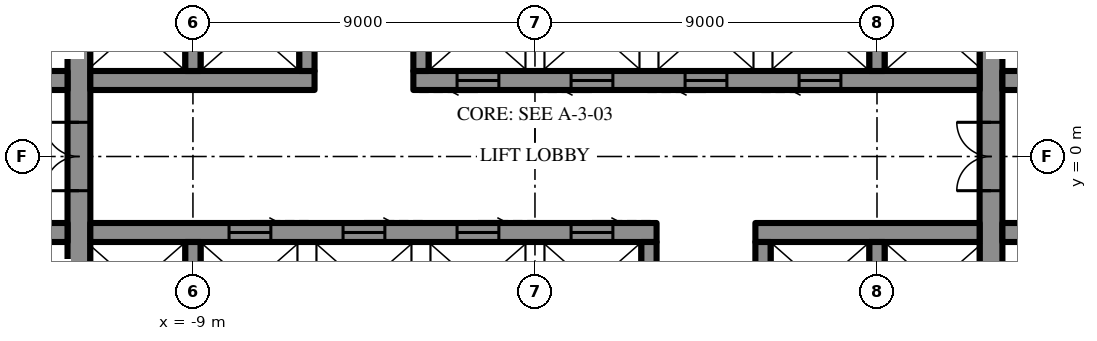
"""IFC4 building model, lengths in metres.
Left out: names, types, materials, properties, quantities, classifications, styles, units other than length and angle.
Written with IfcOpenShell. Run it as: python <this file> out.ifc"""

import sys

from ifc_helpers import new_model, si_unit, direction, frame, frame_2d, origin, place, context, subcontext, project, spatial, rectangle, extrude, element, fill, save


model = new_model("IFC4")
c1 = context("Model", 3, precision=1e-05, world=origin(), true_north=direction((0.0, 1.0)))
c2 = subcontext(c1, "Body", "Model", "MODEL_VIEW")
j1 = project(units=[si_unit("LENGTHUNIT", "METRE"), si_unit("PLANEANGLEUNIT", "RADIAN")], contexts=[c1])
p1 = place(None, origin())
s1 = spatial("IfcSite", under=j1, at=p1, CompositionType="ELEMENT")
p2 = place(p1, origin())
s2 = spatial("IfcBuilding", under=s1, at=p2, CompositionType="ELEMENT")
p3 = place(p2, frame((0.0, 0.0, 295.3)))
s3 = spatial("IfcBuildingStorey", under=s2, at=p3, CompositionType="ELEMENT", Elevation=295.3)
p4 = place(p3, frame((12.0, -10.7, 0.0), z_axis=(0.0, 0.0, 1.0), x_axis=(0.0, 1.0, 0.0)))
e1 = element("IfcWall", 1, at=p4, inside=s3, PredefinedType="SHEAR", context=c2, shape_type="SweptSolid", body=[
    extrude(rectangle(XDim=21.4, YDim=0.6, at=frame_2d((10.7, 0.0))), origin(), (0.0, 0.0, 1.0), 4.2),
])
p5 = place(p4, frame((9.8, 0.0, 0.0)))
e2 = element("IfcOpeningElement", 2, at=p5, cuts=e1, PredefinedType="OPENING", context=c2, shape_type="SweptSolid", body=[
    extrude(rectangle(XDim=1.8, YDim=2.4, at=frame_2d((0.9, 1.2))), frame((0.0, 0.31, 0.0), z_axis=(0.0, -1.0, 0.0), x_axis=(1.0, 0.0, 0.0)), (0.0, 0.0, 1.0), 0.62),
])
p6 = place(p3, frame((-12.0, -10.7, 0.0), z_axis=(0.0, 0.0, 1.0), x_axis=(0.0, 1.0, 0.0)))
e3 = element("IfcWall", 3, at=p6, inside=s3, PredefinedType="SHEAR", context=c2, shape_type="SweptSolid", body=[
    extrude(rectangle(XDim=21.4, YDim=0.6, at=frame_2d((10.7, 0.0))), origin(), (0.0, 0.0, 1.0), 4.2),
])
p7 = place(p6, frame((9.8, 0.0, 0.0)))
e4 = element("IfcOpeningElement", 4, at=p7, cuts=e3, PredefinedType="OPENING", context=c2, shape_type="SweptSolid", body=[
    extrude(rectangle(XDim=1.8, YDim=2.4, at=frame_2d((0.9, 1.2))), frame((0.0, 0.31, 0.0), z_axis=(0.0, -1.0, 0.0), x_axis=(1.0, 0.0, 0.0)), (0.0, 0.0, 1.0), 0.62),
])
p8 = place(p3, frame((-14.5, 2.0, 0.0), z_axis=(0.0, 0.0, 1.0), x_axis=(1.0, 0.0, 0.0)))
e5 = element("IfcWall", 5, at=p8, inside=s3, PredefinedType="SHEAR", context=c2, shape_type="SweptSolid", body=[
    extrude(rectangle(XDim=2.2, YDim=0.5, at=frame_2d((1.1, 0.0))), origin(), (0.0, 0.0, 1.0), 4.2),
])
p9 = place(p8, frame((0.5, 0.0, 0.0)))
e6 = element("IfcOpeningElement", 6, at=p9, cuts=e5, PredefinedType="OPENING", context=c2, shape_type="SweptSolid", body=[
    extrude(rectangle(XDim=0.9, YDim=2.2, at=frame_2d((0.45, 1.1))), frame((0.0, 0.26, 0.0), z_axis=(0.0, -1.0, 0.0), x_axis=(1.0, 0.0, 0.0)), (0.0, 0.0, 1.0), 0.52),
])
p10 = place(p3, frame((-11.7, 2.0, 0.0), z_axis=(0.0, 0.0, 1.0), x_axis=(1.0, 0.0, 0.0)))
e7 = element("IfcWall", 7, at=p10, inside=s3, PredefinedType="SHEAR", context=c2, shape_type="SweptSolid", body=[
    extrude(rectangle(XDim=5.9, YDim=0.5, at=frame_2d((2.95, 0.0))), origin(), (0.0, 0.0, 1.0), 4.2),
])
p11 = place(p3, frame((-3.2, 2.0, 0.0), z_axis=(0.0, 0.0, 1.0), x_axis=(1.0, 0.0, 0.0)))
e8 = element("IfcWall", 8, at=p11, inside=s3, PredefinedType="SHEAR", context=c2, shape_type="SweptSolid", body=[
    extrude(rectangle(XDim=14.9, YDim=0.5, at=frame_2d((7.45, 0.0))), origin(), (0.0, 0.0, 1.0), 4.2),
])
p12 = place(p11, frame((1.15, 0.0, 0.0)))
e9 = element("IfcOpeningElement", 9, at=p12, cuts=e8, PredefinedType="OPENING", context=c2, shape_type="SweptSolid", body=[
    extrude(rectangle(XDim=1.1, YDim=2.2, at=frame_2d((0.55, 1.1))), frame((0.0, 0.26, 0.0), z_axis=(0.0, -1.0, 0.0), x_axis=(1.0, 0.0, 0.0)), (0.0, 0.0, 1.0), 0.52),
])
p13 = place(p11, frame((4.15, 0.0, 0.0)))
e10 = element("IfcOpeningElement", 10, at=p13, cuts=e8, PredefinedType="OPENING", context=c2, shape_type="SweptSolid", body=[
    extrude(rectangle(XDim=1.1, YDim=2.2, at=frame_2d((0.55, 1.1))), frame((0.0, 0.26, 0.0), z_axis=(0.0, -1.0, 0.0), x_axis=(1.0, 0.0, 0.0)), (0.0, 0.0, 1.0), 0.52),
])
p14 = place(p11, frame((7.15, 0.0, 0.0)))
e11 = element("IfcOpeningElement", 11, at=p14, cuts=e8, PredefinedType="OPENING", context=c2, shape_type="SweptSolid", body=[
    extrude(rectangle(XDim=1.1, YDim=2.2, at=frame_2d((0.55, 1.1))), frame((0.0, 0.26, 0.0), z_axis=(0.0, -1.0, 0.0), x_axis=(1.0, 0.0, 0.0)), (0.0, 0.0, 1.0), 0.52),
])
p15 = place(p11, frame((10.15, 0.0, 0.0)))
e12 = element("IfcOpeningElement", 12, at=p15, cuts=e8, PredefinedType="OPENING", context=c2, shape_type="SweptSolid", body=[
    extrude(rectangle(XDim=1.1, YDim=2.2, at=frame_2d((0.55, 1.1))), frame((0.0, 0.26, 0.0), z_axis=(0.0, -1.0, 0.0), x_axis=(1.0, 0.0, 0.0)), (0.0, 0.0, 1.0), 0.52),
])
p16 = place(p3, frame((12.3, 2.0, 0.0), z_axis=(0.0, 0.0, 1.0), x_axis=(1.0, 0.0, 0.0)))
e13 = element("IfcWall", 13, at=p16, inside=s3, PredefinedType="SHEAR", context=c2, shape_type="SweptSolid", body=[
    extrude(rectangle(XDim=2.2, YDim=0.5, at=frame_2d((1.1, 0.0))), origin(), (0.0, 0.0, 1.0), 4.2),
])
p17 = place(p16, frame((0.8, 0.0, 0.0)))
e14 = element("IfcOpeningElement", 14, at=p17, cuts=e13, PredefinedType="OPENING", context=c2, shape_type="SweptSolid", body=[
    extrude(rectangle(XDim=0.9, YDim=2.2, at=frame_2d((0.45, 1.1))), frame((0.0, 0.26, 0.0), z_axis=(0.0, -1.0, 0.0), x_axis=(1.0, 0.0, 0.0)), (0.0, 0.0, 1.0), 0.52),
])
for number, where, z_axis, x_axis in (
    (15, (-9.0, 2.25, 0.0), (0.0, 0.0, 1.0), (0.0, 1.0, 0.0)),
    (16, (-6.0, 2.25, 0.0), (0.0, 0.0, 1.0), (0.0, 1.0, 0.0)),
    (17, (-3.0, 2.25, 0.0), (0.0, 0.0, 1.0), (0.0, 1.0, 0.0)),
    (18, (9.0, 2.25, 0.0), (0.0, 0.0, 1.0), (0.0, 1.0, 0.0)),
):
    element("IfcWall", number, at=place(p3, frame(where, z_axis=z_axis, x_axis=x_axis)), inside=s3, PredefinedType="SHEAR", context=c2, shape_type="SweptSolid", body=[
        extrude(rectangle(XDim=2.3, YDim=0.4, at=frame_2d((1.15, 0.0))), origin(), (0.0, 0.0, 1.0), 4.2),
    ])
p18 = place(p3, frame((14.5, -2.0, 0.0), z_axis=(0.0, 0.0, 1.0), x_axis=(-1.0, 0.0, 0.0)))
e19 = element("IfcWall", 19, at=p18, inside=s3, PredefinedType="SHEAR", context=c2, shape_type="SweptSolid", body=[
    extrude(rectangle(XDim=2.2, YDim=0.5, at=frame_2d((1.1, 0.0))), origin(), (0.0, 0.0, 1.0), 4.2),
])
p19 = place(p18, frame((0.5, 0.0, 0.0)))
e20 = element("IfcOpeningElement", 20, at=p19, cuts=e19, PredefinedType="OPENING", context=c2, shape_type="SweptSolid", body=[
    extrude(rectangle(XDim=0.9, YDim=2.2, at=frame_2d((0.45, 1.1))), frame((0.0, 0.26, 0.0), z_axis=(0.0, -1.0, 0.0), x_axis=(1.0, 0.0, 0.0)), (0.0, 0.0, 1.0), 0.52),
])
p20 = place(p3, frame((11.7, -2.0, 0.0), z_axis=(0.0, 0.0, 1.0), x_axis=(-1.0, 0.0, 0.0)))
e21 = element("IfcWall", 21, at=p20, inside=s3, PredefinedType="SHEAR", context=c2, shape_type="SweptSolid", body=[
    extrude(rectangle(XDim=5.9, YDim=0.5, at=frame_2d((2.95, 0.0))), origin(), (0.0, 0.0, 1.0), 4.2),
])
p21 = place(p3, frame((3.2, -2.0, 0.0), z_axis=(0.0, 0.0, 1.0), x_axis=(-1.0, 0.0, 0.0)))
e22 = element("IfcWall", 22, at=p21, inside=s3, PredefinedType="SHEAR", context=c2, shape_type="SweptSolid", body=[
    extrude(rectangle(XDim=14.9, YDim=0.5, at=frame_2d((7.45, 0.0))), origin(), (0.0, 0.0, 1.0), 4.2),
])
p22 = place(p21, frame((1.15, 0.0, 0.0)))
e23 = element("IfcOpeningElement", 23, at=p22, cuts=e22, PredefinedType="OPENING", context=c2, shape_type="SweptSolid", body=[
    extrude(rectangle(XDim=1.1, YDim=2.2, at=frame_2d((0.55, 1.1))), frame((0.0, 0.26, 0.0), z_axis=(0.0, -1.0, 0.0), x_axis=(1.0, 0.0, 0.0)), (0.0, 0.0, 1.0), 0.52),
])
p23 = place(p21, frame((4.15, 0.0, 0.0)))
e24 = element("IfcOpeningElement", 24, at=p23, cuts=e22, PredefinedType="OPENING", context=c2, shape_type="SweptSolid", body=[
    extrude(rectangle(XDim=1.1, YDim=2.2, at=frame_2d((0.55, 1.1))), frame((0.0, 0.26, 0.0), z_axis=(0.0, -1.0, 0.0), x_axis=(1.0, 0.0, 0.0)), (0.0, 0.0, 1.0), 0.52),
])
p24 = place(p21, frame((7.15, 0.0, 0.0)))
e25 = element("IfcOpeningElement", 25, at=p24, cuts=e22, PredefinedType="OPENING", context=c2, shape_type="SweptSolid", body=[
    extrude(rectangle(XDim=1.1, YDim=2.2, at=frame_2d((0.55, 1.1))), frame((0.0, 0.26, 0.0), z_axis=(0.0, -1.0, 0.0), x_axis=(1.0, 0.0, 0.0)), (0.0, 0.0, 1.0), 0.52),
])
p25 = place(p21, frame((10.15, 0.0, 0.0)))
e26 = element("IfcOpeningElement", 26, at=p25, cuts=e22, PredefinedType="OPENING", context=c2, shape_type="SweptSolid", body=[
    extrude(rectangle(XDim=1.1, YDim=2.2, at=frame_2d((0.55, 1.1))), frame((0.0, 0.26, 0.0), z_axis=(0.0, -1.0, 0.0), x_axis=(1.0, 0.0, 0.0)), (0.0, 0.0, 1.0), 0.52),
])
p26 = place(p3, frame((-12.3, -2.0, 0.0), z_axis=(0.0, 0.0, 1.0), x_axis=(-1.0, 0.0, 0.0)))
e27 = element("IfcWall", 27, at=p26, inside=s3, PredefinedType="SHEAR", context=c2, shape_type="SweptSolid", body=[
    extrude(rectangle(XDim=2.2, YDim=0.5, at=frame_2d((1.1, 0.0))), origin(), (0.0, 0.0, 1.0), 4.2),
])
p27 = place(p26, frame((0.8, 0.0, 0.0)))
e28 = element("IfcOpeningElement", 28, at=p27, cuts=e27, PredefinedType="OPENING", context=c2, shape_type="SweptSolid", body=[
    extrude(rectangle(XDim=0.9, YDim=2.2, at=frame_2d((0.45, 1.1))), frame((0.0, 0.26, 0.0), z_axis=(0.0, -1.0, 0.0), x_axis=(1.0, 0.0, 0.0)), (0.0, 0.0, 1.0), 0.52),
])
for number, where, z_axis, x_axis in (
    (29, (9.0, -2.25, 0.0), (0.0, 0.0, 1.0), (0.0, -1.0, 0.0)),
    (30, (6.0, -2.25, 0.0), (0.0, 0.0, 1.0), (0.0, -1.0, 0.0)),
    (31, (3.0, -2.25, 0.0), (0.0, 0.0, 1.0), (0.0, -1.0, 0.0)),
    (32, (-9.0, -2.25, 0.0), (0.0, 0.0, 1.0), (0.0, -1.0, 0.0)),
):
    element("IfcWall", number, at=place(p3, frame(where, z_axis=z_axis, x_axis=x_axis)), inside=s3, PredefinedType="SHEAR", context=c2, shape_type="SweptSolid", body=[
        extrude(rectangle(XDim=2.3, YDim=0.4, at=frame_2d((1.15, 0.0))), origin(), (0.0, 0.0, 1.0), 4.2),
    ])
p28 = place(p5, origin())
e33 = element("IfcDoor", 33, at=p28, inside=s3, OperationType="DOUBLE_DOOR_SINGLE_SWING", PredefinedType="DOOR", context=c2, shape_type="SweptSolid", body=[
    extrude(rectangle(XDim=1.8, YDim=2.4, at=frame_2d((0.9, 1.2))), frame((0.0, 0.025, 0.0), z_axis=(0.0, -1.0, 0.0), x_axis=(1.0, 0.0, 0.0)), (0.0, 0.0, 1.0), 0.05),
])
fill(e2, e33)
p29 = place(p7, origin())
e34 = element("IfcDoor", 34, at=p29, inside=s3, OperationType="DOUBLE_DOOR_SINGLE_SWING", PredefinedType="DOOR", context=c2, shape_type="SweptSolid", body=[
    extrude(rectangle(XDim=1.8, YDim=2.4, at=frame_2d((0.9, 1.2))), frame((0.0, 0.025, 0.0), z_axis=(0.0, -1.0, 0.0), x_axis=(1.0, 0.0, 0.0)), (0.0, 0.0, 1.0), 0.05),
])
fill(e4, e34)
p30 = place(p12, frame((1.1, 0.0, 0.0), z_axis=(0.0, 0.0, 1.0), x_axis=(-1.0, 0.0, 0.0)))
e35 = element("IfcDoor", 35, at=p30, inside=s3, OperationType="SLIDING_TO_LEFT", PredefinedType="DOOR", context=c2, shape_type="SweptSolid", body=[
    extrude(rectangle(XDim=1.1, YDim=2.2, at=frame_2d((0.55, 1.1))), frame((0.0, 0.025, 0.0), z_axis=(0.0, -1.0, 0.0), x_axis=(1.0, 0.0, 0.0)), (0.0, 0.0, 1.0), 0.05),
])
fill(e9, e35)
p31 = place(p13, frame((1.1, 0.0, 0.0), z_axis=(0.0, 0.0, 1.0), x_axis=(-1.0, 0.0, 0.0)))
e36 = element("IfcDoor", 36, at=p31, inside=s3, OperationType="SLIDING_TO_LEFT", PredefinedType="DOOR", context=c2, shape_type="SweptSolid", body=[
    extrude(rectangle(XDim=1.1, YDim=2.2, at=frame_2d((0.55, 1.1))), frame((0.0, 0.025, 0.0), z_axis=(0.0, -1.0, 0.0), x_axis=(1.0, 0.0, 0.0)), (0.0, 0.0, 1.0), 0.05),
])
fill(e10, e36)
p32 = place(p14, frame((1.1, 0.0, 0.0), z_axis=(0.0, 0.0, 1.0), x_axis=(-1.0, 0.0, 0.0)))
e37 = element("IfcDoor", 37, at=p32, inside=s3, OperationType="SLIDING_TO_LEFT", PredefinedType="DOOR", context=c2, shape_type="SweptSolid", body=[
    extrude(rectangle(XDim=1.1, YDim=2.2, at=frame_2d((0.55, 1.1))), frame((0.0, 0.025, 0.0), z_axis=(0.0, -1.0, 0.0), x_axis=(1.0, 0.0, 0.0)), (0.0, 0.0, 1.0), 0.05),
])
fill(e11, e37)
p33 = place(p15, frame((1.1, 0.0, 0.0), z_axis=(0.0, 0.0, 1.0), x_axis=(-1.0, 0.0, 0.0)))
e38 = element("IfcDoor", 38, at=p33, inside=s3, OperationType="SLIDING_TO_LEFT", PredefinedType="DOOR", context=c2, shape_type="SweptSolid", body=[
    extrude(rectangle(XDim=1.1, YDim=2.2, at=frame_2d((0.55, 1.1))), frame((0.0, 0.025, 0.0), z_axis=(0.0, -1.0, 0.0), x_axis=(1.0, 0.0, 0.0)), (0.0, 0.0, 1.0), 0.05),
])
fill(e12, e38)
p34 = place(p22, frame((1.1, 0.0, 0.0), z_axis=(0.0, 0.0, 1.0), x_axis=(-1.0, 0.0, 0.0)))
e39 = element("IfcDoor", 39, at=p34, inside=s3, OperationType="SLIDING_TO_LEFT", PredefinedType="DOOR", context=c2, shape_type="SweptSolid", body=[
    extrude(rectangle(XDim=1.1, YDim=2.2, at=frame_2d((0.55, 1.1))), frame((0.0, 0.025, 0.0), z_axis=(0.0, -1.0, 0.0), x_axis=(1.0, 0.0, 0.0)), (0.0, 0.0, 1.0), 0.05),
])
fill(e23, e39)
p35 = place(p23, frame((1.1, 0.0, 0.0), z_axis=(0.0, 0.0, 1.0), x_axis=(-1.0, 0.0, 0.0)))
e40 = element("IfcDoor", 40, at=p35, inside=s3, OperationType="SLIDING_TO_LEFT", PredefinedType="DOOR", context=c2, shape_type="SweptSolid", body=[
    extrude(rectangle(XDim=1.1, YDim=2.2, at=frame_2d((0.55, 1.1))), frame((0.0, 0.025, 0.0), z_axis=(0.0, -1.0, 0.0), x_axis=(1.0, 0.0, 0.0)), (0.0, 0.0, 1.0), 0.05),
])
fill(e24, e40)
p36 = place(p24, frame((1.1, 0.0, 0.0), z_axis=(0.0, 0.0, 1.0), x_axis=(-1.0, 0.0, 0.0)))
e41 = element("IfcDoor", 41, at=p36, inside=s3, OperationType="SLIDING_TO_LEFT", PredefinedType="DOOR", context=c2, shape_type="SweptSolid", body=[
    extrude(rectangle(XDim=1.1, YDim=2.2, at=frame_2d((0.55, 1.1))), frame((0.0, 0.025, 0.0), z_axis=(0.0, -1.0, 0.0), x_axis=(1.0, 0.0, 0.0)), (0.0, 0.0, 1.0), 0.05),
])
fill(e25, e41)
p37 = place(p25, frame((1.1, 0.0, 0.0), z_axis=(0.0, 0.0, 1.0), x_axis=(-1.0, 0.0, 0.0)))
e42 = element("IfcDoor", 42, at=p37, inside=s3, OperationType="SLIDING_TO_LEFT", PredefinedType="DOOR", context=c2, shape_type="SweptSolid", body=[
    extrude(rectangle(XDim=1.1, YDim=2.2, at=frame_2d((0.55, 1.1))), frame((0.0, 0.025, 0.0), z_axis=(0.0, -1.0, 0.0), x_axis=(1.0, 0.0, 0.0)), (0.0, 0.0, 1.0), 0.05),
])
fill(e26, e42)
save(model, sys.argv[1])
